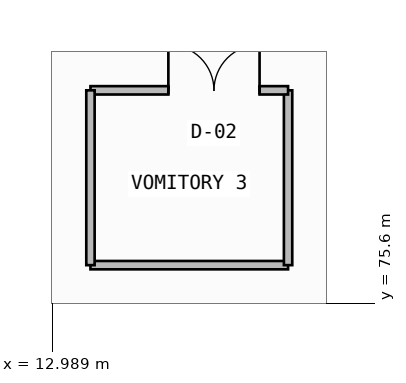
"""IFC4 building model, lengths in metres.
Left out: names, types, materials, properties, quantities, classifications, styles, units other than length and angle.
Written with IfcOpenShell. Run it as: python <this file> out.ifc"""

import sys

from ifc_helpers import new_model, si_unit, direction, frame, frame_2d, origin, place, context, subcontext, project, spatial, rectangle, extrude, element, fill, save


model = new_model("IFC4")
c1 = context("Model", 3, precision=1e-05, world=origin(), true_north=direction((0.0, 1.0)))
c2 = subcontext(c1, "Body", "Model", "MODEL_VIEW")
j1 = project(units=[si_unit("LENGTHUNIT", "METRE"), si_unit("PLANEANGLEUNIT", "RADIAN")], contexts=[c1])
p1 = place(None, origin())
s1 = spatial("IfcSite", under=j1, at=p1, CompositionType="ELEMENT")
p2 = place(p1, origin())
s2 = spatial("IfcBuilding", under=s1, at=p2, CompositionType="ELEMENT")
p3 = place(p2, frame((0.0, 0.0, 13.2)))
s3 = spatial("IfcBuildingStorey", under=s2, at=p3, CompositionType="ELEMENT", Elevation=13.2)
p4 = place(p3, frame((14.0, 76.6, 0.0), z_axis=(0.0, 0.0, 1.0), x_axis=(1.0, 0.0, 0.0)))
e1 = element("IfcWall", 1, at=p4, inside=s3, PredefinedType="SOLIDWALL", context=c2, shape_type="SweptSolid", body=[
    extrude(rectangle(XDim=5.2, YDim=0.22, at=frame_2d((2.6, 0.0))), origin(), (0.0, 0.0, 1.0), 3.365),
])
p5 = place(p3, frame((19.2, 76.6, 0.0), z_axis=(0.0, 0.0, 1.0), x_axis=(0.0, 1.0, 0.0)))
e2 = element("IfcWall", 2, at=p5, inside=s3, PredefinedType="SOLIDWALL", context=c2, shape_type="SweptSolid", body=[
    extrude(rectangle(XDim=4.6, YDim=0.22, at=frame_2d((2.3, 0.0))), origin(), (0.0, 0.0, 1.0), 3.365),
])
p6 = place(p3, frame((19.2, 81.2, 0.0), z_axis=(0.0, 0.0, 1.0), x_axis=(-1.0, 0.0, 0.0)))
e3 = element("IfcWall", 3, at=p6, inside=s3, PredefinedType="SOLIDWALL", context=c2, shape_type="SweptSolid", body=[
    extrude(rectangle(XDim=5.2, YDim=0.22, at=frame_2d((2.6, 0.0))), origin(), (0.0, 0.0, 1.0), 3.365),
])
p7 = place(p6, frame((0.75, 0.0, 0.0)))
e4 = element("IfcOpeningElement", 4, at=p7, cuts=e3, PredefinedType="OPENING", context=c2, shape_type="SweptSolid", body=[
    extrude(rectangle(XDim=2.4, YDim=2.4, at=frame_2d((1.2, 1.2))), frame((0.0, 0.12, 0.0), z_axis=(0.0, -1.0, 0.0), x_axis=(1.0, 0.0, 0.0)), (0.0, 0.0, 1.0), 0.24),
])
p8 = place(p3, frame((14.0, 81.2, 0.0), z_axis=(0.0, 0.0, 1.0), x_axis=(0.0, -1.0, 0.0)))
e5 = element("IfcWall", 5, at=p8, inside=s3, PredefinedType="SOLIDWALL", context=c2, shape_type="SweptSolid", body=[
    extrude(rectangle(XDim=4.6, YDim=0.22, at=frame_2d((2.3, 0.0))), origin(), (0.0, 0.0, 1.0), 3.88),
])
p9 = place(p7, frame((2.4, 0.0, 0.0), z_axis=(0.0, 0.0, 1.0), x_axis=(-1.0, 0.0, 0.0)))
e6 = element("IfcDoor", 6, at=p9, inside=s3, OperationType="DOUBLE_DOOR_SINGLE_SWING", PredefinedType="USERDEFINED", context=c2, shape_type="SweptSolid", body=[
    extrude(rectangle(XDim=2.4, YDim=2.4, at=frame_2d((1.2, 1.2))), frame((0.0, 0.025, 0.0), z_axis=(0.0, -1.0, 0.0), x_axis=(1.0, 0.0, 0.0)), (0.0, 0.0, 1.0), 0.05),
])
fill(e4, e6)
save(model, sys.argv[1])
